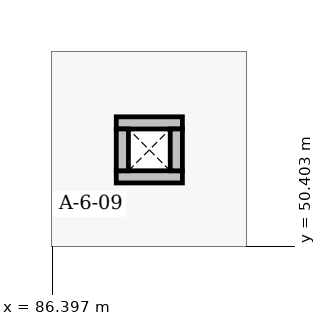
"""IFC4 building model, lengths in metres.
Left out: names, types, materials, properties, quantities, classifications, styles, units other than length and angle.
Written with IfcOpenShell. Run it as: python <this file> out.ifc"""

import sys

from ifc_helpers import new_model, si_unit, direction, frame, frame_2d, origin, place, context, subcontext, project, spatial, rectangle, extrude, element, save


model = new_model("IFC4")
c1 = context("Model", 3, precision=1e-05, world=origin(), true_north=direction((0.0, 1.0)))
c2 = subcontext(c1, "Body", "Model", "MODEL_VIEW")
j1 = project(units=[si_unit("LENGTHUNIT", "METRE"), si_unit("PLANEANGLEUNIT", "RADIAN")], contexts=[c1])
p1 = place(None, origin())
s1 = spatial("IfcSite", under=j1, at=p1, CompositionType="ELEMENT")
p2 = place(p1, origin())
s2 = spatial("IfcBuilding", under=s1, at=p2, CompositionType="ELEMENT")
p3 = place(p2, frame((0.0, 0.0, 4.8)))
s3 = spatial("IfcBuildingStorey", under=s2, at=p3, CompositionType="ELEMENT", Elevation=4.8)
for number, where, z_axis, x_axis in (
    (1, (87.24, 51.32, 0.0), (0.0, 0.0, 1.0), (1.0, 0.0, 0.0)),
    (2, (87.24, 52.03, 0.0), (0.0, 0.0, 1.0), (1.0, 0.0, 0.0)),
):
    element("IfcWall", number, at=place(p3, frame(where, z_axis=z_axis, x_axis=x_axis)), inside=s3, PredefinedType="PARTITIONING", context=c2, shape_type="SweptSolid", body=[
        extrude(rectangle(XDim=0.87, YDim=0.16, at=frame_2d((0.435, 0.0))), origin(), (0.0, 0.0, 1.0), 3.35),
    ])
for number, where, z_axis, x_axis in (
    (3, (87.32, 51.4, 0.0), (0.0, 0.0, 1.0), (0.0, 1.0, 0.0)),
    (4, (88.03, 51.4, 0.0), (0.0, 0.0, 1.0), (0.0, 1.0, 0.0)),
):
    element("IfcWall", number, at=place(p3, frame(where, z_axis=z_axis, x_axis=x_axis)), inside=s3, PredefinedType="PARTITIONING", context=c2, shape_type="SweptSolid", body=[
        extrude(rectangle(XDim=0.55, YDim=0.16, at=frame_2d((0.275, 0.0))), origin(), (0.0, 0.0, 1.0), 3.35),
    ])
save(model, sys.argv[1])
